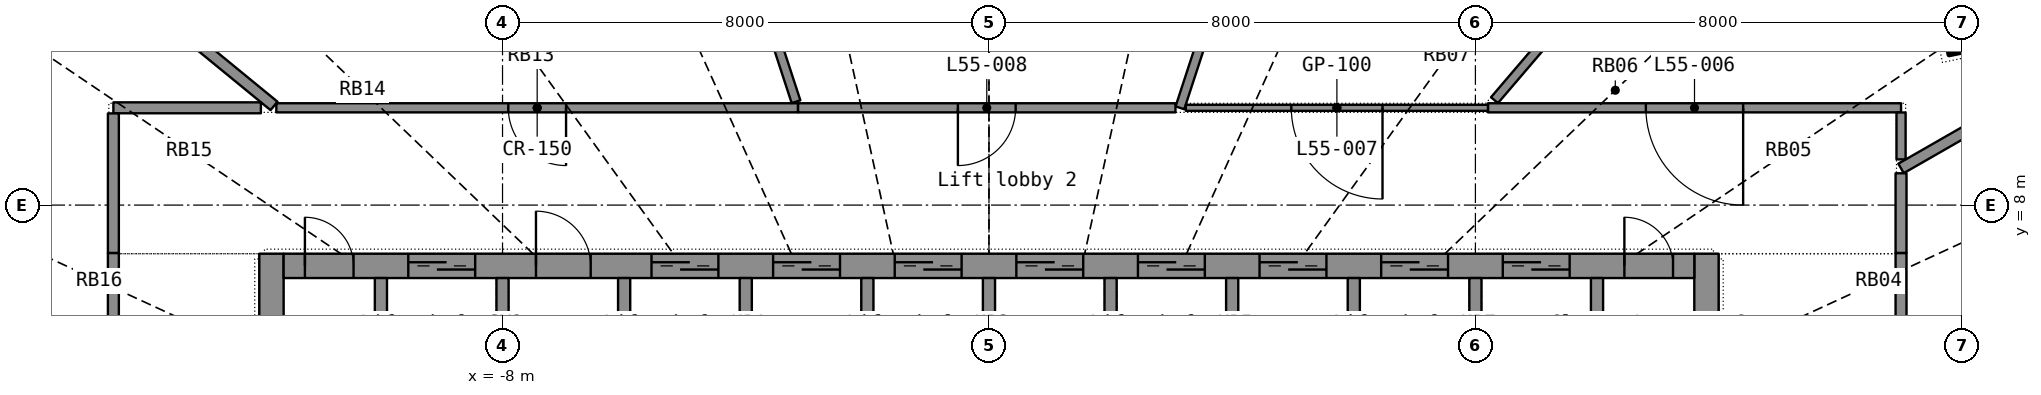
"""IFC4 building model, lengths in metres.
Left out: names, types, materials, properties, quantities, classifications, styles, units other than length and angle.
Written with IfcOpenShell. Run it as: python <this file> out.ifc"""

import sys

from ifc_helpers import new_model, si_unit, direction, frame, frame_2d, origin, origin_2d, place, context, subcontext, project, spatial, rectangle, hollow_rectangle, extrude, element, fill, save


model = new_model("IFC4")
c1 = context("Model", 3, precision=1e-05, world=origin(), true_north=direction((0.0, 1.0)))
c2 = subcontext(c1, "Body", "Model", "MODEL_VIEW")
j1 = project(units=[si_unit("LENGTHUNIT", "METRE"), si_unit("PLANEANGLEUNIT", "RADIAN")], contexts=[c1])
p1 = place(None, origin())
s1 = spatial("IfcSite", under=j1, at=p1, CompositionType="ELEMENT")
p2 = place(p1, origin())
s2 = spatial("IfcBuilding", under=s1, at=p2, CompositionType="ELEMENT")
p3 = place(p2, frame((0.0, 0.0, 228.2)))
s3 = spatial("IfcBuildingStorey", under=s2, at=p3, CompositionType="ELEMENT", Elevation=228.2)
p4 = place(p3, frame((16.021, 10.823, 0.0), z_axis=(-0.026512179, -0.018202391, 0.999482755), x_axis=(0.720721695, -0.693194109, 0.006493471)))
e1 = element("IfcColumn", 1, at=p4, inside=s3, PredefinedType="COLUMN", context=c2, shape_type="SweptSolid", body=[
    extrude(hollow_rectangle(XDim=0.6, YDim=0.6, WallThickness=0.025, at=origin_2d()), origin(), (0.0, 0.0, 1.0), 3.702),
])
p5 = place(p3, frame((-11.8, -7.2, 0.0), z_axis=(0.0, 0.0, 1.0), x_axis=(0.0, 1.0, 0.0)))
e2 = element("IfcWall", 2, at=p5, inside=s3, PredefinedType="SHEAR", context=c2, shape_type="SweptSolid", body=[
    extrude(rectangle(XDim=14.4, YDim=0.4, at=frame_2d((7.2, 0.0))), origin(), (0.0, 0.0, 1.0), 3.3),
])
p6 = place(p5, frame((6.5, 0.0, 0.0)))
e3 = element("IfcOpeningElement", 3, at=p6, cuts=e2, PredefinedType="OPENING", context=c2, shape_type="SweptSolid", body=[
    extrude(rectangle(XDim=1.4, YDim=2.2, at=frame_2d((0.7, 1.1))), frame((0.0, 0.21, 0.0), z_axis=(0.0, -1.0, 0.0), x_axis=(1.0, 0.0, 0.0)), (0.0, 0.0, 1.0), 0.42),
])
p7 = place(p3, frame((11.8, -7.2, 0.0), z_axis=(0.0, 0.0, 1.0), x_axis=(0.0, 1.0, 0.0)))
e4 = element("IfcWall", 4, at=p7, inside=s3, PredefinedType="SHEAR", context=c2, shape_type="SweptSolid", body=[
    extrude(rectangle(XDim=14.4, YDim=0.4, at=frame_2d((7.2, 0.0))), origin(), (0.0, 0.0, 1.0), 3.3),
])
p8 = place(p7, frame((6.5, 0.0, 0.0)))
e5 = element("IfcOpeningElement", 5, at=p8, cuts=e4, PredefinedType="OPENING", context=c2, shape_type="SweptSolid", body=[
    extrude(rectangle(XDim=1.4, YDim=2.2, at=frame_2d((0.7, 1.1))), frame((0.0, 0.21, 0.0), z_axis=(0.0, -1.0, 0.0), x_axis=(1.0, 0.0, 0.0)), (0.0, 0.0, 1.0), 0.42),
])
p9 = place(p3, frame((-11.6, 7.0, 0.0), z_axis=(0.0, 0.0, 1.0), x_axis=(1.0, 0.0, 0.0)))
e6 = element("IfcWall", 6, at=p9, inside=s3, PredefinedType="SHEAR", context=c2, shape_type="SweptSolid", body=[
    extrude(rectangle(XDim=23.2, YDim=0.4, at=frame_2d((11.6, 0.0))), origin(), (0.0, 0.0, 1.0), 3.3),
])
p10 = place(p9, frame((2.05, 0.0, 0.0)))
e7 = element("IfcOpeningElement", 7, at=p10, cuts=e6, PredefinedType="OPENING", context=c2, shape_type="SweptSolid", body=[
    extrude(rectangle(XDim=1.1, YDim=2.2, at=frame_2d((0.55, 1.1))), frame((0.0, 0.21, 0.0), z_axis=(0.0, -1.0, 0.0), x_axis=(1.0, 0.0, 0.0)), (0.0, 0.0, 1.0), 0.42),
])
p11 = place(p9, frame((6.05, 0.0, 0.0)))
e8 = element("IfcOpeningElement", 8, at=p11, cuts=e6, PredefinedType="OPENING", context=c2, shape_type="SweptSolid", body=[
    extrude(rectangle(XDim=1.1, YDim=2.2, at=frame_2d((0.55, 1.1))), frame((0.0, 0.21, 0.0), z_axis=(0.0, -1.0, 0.0), x_axis=(1.0, 0.0, 0.0)), (0.0, 0.0, 1.0), 0.42),
])
p12 = place(p9, frame((8.05, 0.0, 0.0)))
e9 = element("IfcOpeningElement", 9, at=p12, cuts=e6, PredefinedType="OPENING", context=c2, shape_type="SweptSolid", body=[
    extrude(rectangle(XDim=1.1, YDim=2.2, at=frame_2d((0.55, 1.1))), frame((0.0, 0.21, 0.0), z_axis=(0.0, -1.0, 0.0), x_axis=(1.0, 0.0, 0.0)), (0.0, 0.0, 1.0), 0.42),
])
p13 = place(p9, frame((10.05, 0.0, 0.0)))
e10 = element("IfcOpeningElement", 10, at=p13, cuts=e6, PredefinedType="OPENING", context=c2, shape_type="SweptSolid", body=[
    extrude(rectangle(XDim=1.1, YDim=2.2, at=frame_2d((0.55, 1.1))), frame((0.0, 0.21, 0.0), z_axis=(0.0, -1.0, 0.0), x_axis=(1.0, 0.0, 0.0)), (0.0, 0.0, 1.0), 0.42),
])
p14 = place(p9, frame((12.05, 0.0, 0.0)))
e11 = element("IfcOpeningElement", 11, at=p14, cuts=e6, PredefinedType="OPENING", context=c2, shape_type="SweptSolid", body=[
    extrude(rectangle(XDim=1.1, YDim=2.2, at=frame_2d((0.55, 1.1))), frame((0.0, 0.21, 0.0), z_axis=(0.0, -1.0, 0.0), x_axis=(1.0, 0.0, 0.0)), (0.0, 0.0, 1.0), 0.42),
])
p15 = place(p9, frame((14.05, 0.0, 0.0)))
e12 = element("IfcOpeningElement", 12, at=p15, cuts=e6, PredefinedType="OPENING", context=c2, shape_type="SweptSolid", body=[
    extrude(rectangle(XDim=1.1, YDim=2.2, at=frame_2d((0.55, 1.1))), frame((0.0, 0.21, 0.0), z_axis=(0.0, -1.0, 0.0), x_axis=(1.0, 0.0, 0.0)), (0.0, 0.0, 1.0), 0.42),
])
p16 = place(p9, frame((16.05, 0.0, 0.0)))
e13 = element("IfcOpeningElement", 13, at=p16, cuts=e6, PredefinedType="OPENING", context=c2, shape_type="SweptSolid", body=[
    extrude(rectangle(XDim=1.1, YDim=2.2, at=frame_2d((0.55, 1.1))), frame((0.0, 0.21, 0.0), z_axis=(0.0, -1.0, 0.0), x_axis=(1.0, 0.0, 0.0)), (0.0, 0.0, 1.0), 0.42),
])
p17 = place(p9, frame((18.05, 0.0, 0.0)))
e14 = element("IfcOpeningElement", 14, at=p17, cuts=e6, PredefinedType="OPENING", context=c2, shape_type="SweptSolid", body=[
    extrude(rectangle(XDim=1.1, YDim=2.2, at=frame_2d((0.55, 1.1))), frame((0.0, 0.21, 0.0), z_axis=(0.0, -1.0, 0.0), x_axis=(1.0, 0.0, 0.0)), (0.0, 0.0, 1.0), 0.42),
])
p18 = place(p9, frame((20.05, 0.0, 0.0)))
e15 = element("IfcOpeningElement", 15, at=p18, cuts=e6, PredefinedType="OPENING", context=c2, shape_type="SweptSolid", body=[
    extrude(rectangle(XDim=1.1, YDim=2.2, at=frame_2d((0.55, 1.1))), frame((0.0, 0.21, 0.0), z_axis=(0.0, -1.0, 0.0), x_axis=(1.0, 0.0, 0.0)), (0.0, 0.0, 1.0), 0.42),
])
p19 = place(p9, frame((4.15, 0.0, 0.0)))
e16 = element("IfcOpeningElement", 16, at=p19, cuts=e6, PredefinedType="OPENING", context=c2, shape_type="SweptSolid", body=[
    extrude(rectangle(XDim=0.9, YDim=2.1, at=frame_2d((0.45, 1.05))), frame((0.0, 0.21, 0.0), z_axis=(0.0, -1.0, 0.0), x_axis=(1.0, 0.0, 0.0)), (0.0, 0.0, 1.0), 0.42),
])
p20 = place(p9, frame((0.35, 0.0, 0.0)))
e17 = element("IfcOpeningElement", 17, at=p20, cuts=e6, PredefinedType="OPENING", context=c2, shape_type="SweptSolid", body=[
    extrude(rectangle(XDim=0.8, YDim=2.05, at=frame_2d((0.4, 1.025))), frame((0.0, 0.21, 0.0), z_axis=(0.0, -1.0, 0.0), x_axis=(1.0, 0.0, 0.0)), (0.0, 0.0, 1.0), 0.42),
])
p21 = place(p9, frame((22.05, 0.0, 0.0)))
e18 = element("IfcOpeningElement", 18, at=p21, cuts=e6, PredefinedType="OPENING", context=c2, shape_type="SweptSolid", body=[
    extrude(rectangle(XDim=0.8, YDim=2.05, at=frame_2d((0.4, 1.025))), frame((0.0, 0.21, 0.0), z_axis=(0.0, -1.0, 0.0), x_axis=(1.0, 0.0, 0.0)), (0.0, 0.0, 1.0), 0.42),
])
for number, where, z_axis, x_axis in (
    (19, (-10.0, 3.9, 0.0), (0.0, 0.0, 1.0), (0.0, 1.0, 0.0)),
    (20, (-8.0, 3.9, 0.0), (0.0, 0.0, 1.0), (0.0, 1.0, 0.0)),
    (21, (-6.0, 3.9, 0.0), (0.0, 0.0, 1.0), (0.0, 1.0, 0.0)),
    (22, (-4.0, 3.9, 0.0), (0.0, 0.0, 1.0), (0.0, 1.0, 0.0)),
    (23, (-2.0, 3.9, 0.0), (0.0, 0.0, 1.0), (0.0, 1.0, 0.0)),
    (24, (0.0, 3.9, 0.0), (0.0, 0.0, 1.0), (0.0, 1.0, 0.0)),
    (25, (2.0, 3.9, 0.0), (0.0, 0.0, 1.0), (0.0, 1.0, 0.0)),
    (26, (4.0, 3.9, 0.0), (0.0, 0.0, 1.0), (0.0, 1.0, 0.0)),
    (27, (6.0, 3.9, 0.0), (0.0, 0.0, 1.0), (0.0, 1.0, 0.0)),
    (28, (8.0, 3.9, 0.0), (0.0, 0.0, 1.0), (0.0, 1.0, 0.0)),
    (29, (10.0, 3.9, 0.0), (0.0, 0.0, 1.0), (0.0, 1.0, 0.0)),
):
    element("IfcWall", number, at=place(p3, frame(where, z_axis=z_axis, x_axis=x_axis)), inside=s3, PredefinedType="SHEAR", context=c2, shape_type="SweptSolid", body=[
        extrude(rectangle(XDim=2.9, YDim=0.2, at=frame_2d((1.45, 0.0))), origin(), (0.0, 0.0, 1.0), 3.3),
    ])
p22 = place(p3, frame((-3.14, 9.6, 0.0), z_axis=(0.0, 0.0, 1.0), x_axis=(-1.0, 0.0, 0.0)))
e30 = element("IfcWall", 30, at=p22, inside=s3, PredefinedType="PARTITIONING", context=c2, shape_type="SweptSolid", body=[
    extrude(rectangle(XDim=8.58, YDim=0.15, at=frame_2d((4.29, 0.0))), origin(), (0.0, 0.0, 1.0), 2.4),
])
p23 = place(p22, frame((3.815, 0.0, 0.0)))
e31 = element("IfcOpeningElement", 31, at=p23, cuts=e30, PredefinedType="OPENING", context=c2, shape_type="SweptSolid", body=[
    extrude(rectangle(XDim=0.95, YDim=2.15, at=frame_2d((0.475, 1.075))), frame((0.0, 0.085, 0.0), z_axis=(0.0, -1.0, 0.0), x_axis=(1.0, 0.0, 0.0)), (0.0, 0.0, 1.0), 0.17),
])
p24 = place(p3, frame((-5.515, 16.859, 0.0), z_axis=(0.0, 0.0, 1.0), x_axis=(0.310923007, -0.950435102, 0.0)))
e32 = element("IfcWall", 32, at=p24, inside=s3, PredefinedType="PARTITIONING", context=c2, shape_type="SweptSolid", body=[
    extrude(rectangle(XDim=7.532, YDim=0.15, at=frame_2d((3.766, 0.0))), origin(), (0.0, 0.0, 1.0), 2.4),
])
p25 = place(p3, frame((5.515, 16.858, 0.0), z_axis=(0.0, 0.0, 1.0), x_axis=(-0.31091882, -0.950436472, 0.0)))
e33 = element("IfcWall", 33, at=p25, inside=s3, PredefinedType="PARTITIONING", context=c2, shape_type="SweptSolid", body=[
    extrude(rectangle(XDim=7.636, YDim=0.15, at=frame_2d((3.818, 0.0))), origin(), (0.0, 0.0, 1.0), 2.4),
])
p26 = place(p3, frame((15.0, 9.6, 0.0), z_axis=(0.0, 0.0, 1.0), x_axis=(-1.0, 0.0, 0.0)))
e34 = element("IfcWall", 34, at=p26, inside=s3, PredefinedType="PARTITIONING", context=c2, shape_type="SweptSolid", body=[
    extrude(rectangle(XDim=6.793, YDim=0.15, at=frame_2d((3.397, 0.0))), origin(), (0.0, 0.0, 1.0), 2.4),
])
p27 = place(p26, frame((2.597, 0.0, 0.0)))
e35 = element("IfcOpeningElement", 35, at=p27, cuts=e34, PredefinedType="OPENING", context=c2, shape_type="SweptSolid", body=[
    extrude(rectangle(XDim=1.6, YDim=2.4, at=frame_2d((0.8, 1.2))), frame((0.0, 0.085, 0.0), z_axis=(0.0, -1.0, 0.0), x_axis=(1.0, 0.0, 0.0)), (0.0, 0.0, 1.0), 0.17),
])
p28 = place(p3, frame((3.067, 9.6, 0.0), z_axis=(0.0, 0.0, 1.0), x_axis=(-1.0, 0.0, 0.0)))
e36 = element("IfcWall", 36, at=p28, inside=s3, PredefinedType="PARTITIONING", context=c2, shape_type="SweptSolid", body=[
    extrude(rectangle(XDim=6.207, YDim=0.15, at=frame_2d((3.103, 0.0))), origin(), (0.0, 0.0, 1.0), 2.4),
])
p29 = place(p28, frame((2.628, 0.0, 0.0)))
e37 = element("IfcOpeningElement", 37, at=p29, cuts=e36, PredefinedType="OPENING", context=c2, shape_type="SweptSolid", body=[
    extrude(rectangle(XDim=0.95, YDim=2.15, at=frame_2d((0.475, 1.075))), frame((0.0, 0.085, 0.0), z_axis=(0.0, -1.0, 0.0), x_axis=(1.0, 0.0, 0.0)), (0.0, 0.0, 1.0), 0.17),
])
p30 = place(p3, frame((-14.4, 7.212, 0.0), z_axis=(0.0, 0.0, 1.0), x_axis=(0.0, -1.0, 0.0)))
e38 = element("IfcWall", 38, at=p30, inside=s3, PredefinedType="PARTITIONING", context=c2, shape_type="SweptSolid", body=[
    extrude(rectangle(XDim=5.712, YDim=0.18, at=frame_2d((2.856, 0.0))), origin(), (0.0, 0.0, 1.0), 2.4),
])
p31 = place(p30, frame((2.356, 0.0, 0.0)))
e39 = element("IfcOpeningElement", 39, at=p31, cuts=e38, PredefinedType="OPENING", context=c2, shape_type="SweptSolid", body=[
    extrude(rectangle(XDim=1.0, YDim=2.1, at=frame_2d((0.5, 1.05))), frame((0.0, 0.1, 0.0), z_axis=(0.0, -1.0, 0.0), x_axis=(1.0, 0.0, 0.0)), (0.0, 0.0, 1.0), 0.2),
])
p32 = place(p3, frame((15.0, 1.5, 0.0), z_axis=(0.0, 0.0, 1.0), x_axis=(0.0, 1.0, 0.0)))
e40 = element("IfcWall", 40, at=p32, inside=s3, PredefinedType="PARTITIONING", context=c2, shape_type="SweptSolid", body=[
    extrude(rectangle(XDim=5.712, YDim=0.18, at=frame_2d((2.856, 0.0))), origin(), (0.0, 0.0, 1.0), 2.4),
])
p33 = place(p32, frame((2.356, 0.0, 0.0)))
e41 = element("IfcOpeningElement", 41, at=p33, cuts=e40, PredefinedType="OPENING", context=c2, shape_type="SweptSolid", body=[
    extrude(rectangle(XDim=1.0, YDim=2.1, at=frame_2d((0.5, 1.05))), frame((0.0, 0.1, 0.0), z_axis=(0.0, -1.0, 0.0), x_axis=(1.0, 0.0, 0.0)), (0.0, 0.0, 1.0), 0.2),
])
p34 = place(p3, frame((8.207, 9.6, 0.0), z_axis=(0.0, 0.0, 1.0), x_axis=(-1.0, 0.0, 0.0)))
e42 = element("IfcWall", 42, at=p34, inside=s3, PredefinedType="PARTITIONING", context=c2, shape_type="SweptSolid", body=[
    extrude(rectangle(XDim=4.969, YDim=0.1, at=frame_2d((2.484, 0.0))), origin(), (0.0, 0.0, 1.0), 2.4),
])
p35 = place(p34, frame((1.734, 0.0, 0.0)))
e43 = element("IfcOpeningElement", 43, at=p35, cuts=e42, PredefinedType="OPENING", context=c2, shape_type="SweptSolid", body=[
    extrude(rectangle(XDim=1.5, YDim=2.4, at=frame_2d((0.75, 1.2))), frame((0.0, 0.06, 0.0), z_axis=(0.0, -1.0, 0.0), x_axis=(1.0, 0.0, 0.0)), (0.0, 0.0, 1.0), 0.12),
])
p36 = place(p3, frame((11.079, 12.96, 0.0), z_axis=(0.0, 0.0, 1.0), x_axis=(-0.649789169, -0.760114489, 0.0)))
e44 = element("IfcWall", 44, at=p36, inside=s3, PredefinedType="PARTITIONING", context=c2, shape_type="SweptSolid", body=[
    extrude(rectangle(XDim=4.255, YDim=0.15, at=frame_2d((2.128, 0.0))), origin(), (0.0, 0.0, 1.0), 2.4),
])
p37 = place(p3, frame((-15.075, 12.348, 0.0), z_axis=(0.0, 0.0, 1.0), x_axis=(0.773594361, -0.633681122, 0.0)))
e45 = element("IfcWall", 45, at=p37, inside=s3, PredefinedType="PARTITIONING", context=c2, shape_type="SweptSolid", body=[
    extrude(rectangle(XDim=4.287, YDim=0.18, at=frame_2d((2.144, 0.0))), origin(), (0.0, 0.0, 1.0), 2.4),
])
p38 = place(p3, frame((17.466, 10.017, 0.0), z_axis=(0.0, 0.0, 1.0), x_axis=(-0.867459752, -0.497507365, 0.0)))
e46 = element("IfcWall", 46, at=p38, inside=s3, PredefinedType="PARTITIONING", context=c2, shape_type="SweptSolid", body=[
    extrude(rectangle(XDim=2.842, YDim=0.18, at=frame_2d((1.421, 0.0))), origin(), (0.0, 0.0, 1.0), 2.4),
])
p39 = place(p3, frame((-11.974, 9.6, 0.0), z_axis=(0.0, 0.0, 1.0), x_axis=(-1.0, 0.0, 0.0)))
e47 = element("IfcWall", 47, at=p39, inside=s3, PredefinedType="PARTITIONING", context=c2, shape_type="SweptSolid", body=[
    extrude(rectangle(XDim=2.426, YDim=0.18, at=frame_2d((1.213, 0.0))), origin(), (0.0, 0.0, 1.0), 2.4),
])
p40 = place(p3, frame((-14.4, 9.508, 0.0), z_axis=(0.0, 0.0, 1.0), x_axis=(0.0, -1.0, 0.0)))
e48 = element("IfcWall", 48, at=p40, inside=s3, PredefinedType="PARTITIONING", context=c2, shape_type="SweptSolid", body=[
    extrude(rectangle(XDim=2.295, YDim=0.18, at=frame_2d((1.147, 0.0))), origin(), (0.0, 0.0, 1.0), 2.4),
])
p41 = place(p3, frame((15.0, 7.213, 0.0), z_axis=(0.0, 0.0, 1.0), x_axis=(0.0, 1.0, 0.0)))
e49 = element("IfcWall", 49, at=p41, inside=s3, PredefinedType="PARTITIONING", context=c2, shape_type="SweptSolid", body=[
    extrude(rectangle(XDim=1.31, YDim=0.18, at=frame_2d((0.655, 0.0))), origin(), (0.0, 0.0, 1.0), 2.4),
])
p42 = place(p3, frame((15.0, 8.752, 0.0), z_axis=(0.0, 0.0, 1.0), x_axis=(0.0, 1.0, 0.0)))
e50 = element("IfcWall", 50, at=p42, inside=s3, PredefinedType="PARTITIONING", context=c2, shape_type="SweptSolid", body=[
    extrude(rectangle(XDim=0.771, YDim=0.15, at=frame_2d((0.385, 0.0))), origin(), (0.0, 0.0, 1.0), 2.4),
])
p43 = place(p10, origin())
e51 = element("IfcDoor", 51, at=p43, inside=s3, OperationType="DOUBLE_DOOR_SLIDING", PredefinedType="DOOR", context=c2, shape_type="SweptSolid", body=[
    extrude(rectangle(XDim=1.1, YDim=2.2, at=frame_2d((0.55, 1.1))), frame((0.0, 0.025, 0.0), z_axis=(0.0, -1.0, 0.0), x_axis=(1.0, 0.0, 0.0)), (0.0, 0.0, 1.0), 0.05),
])
fill(e7, e51)
p44 = place(p11, origin())
e52 = element("IfcDoor", 52, at=p44, inside=s3, OperationType="DOUBLE_DOOR_SLIDING", PredefinedType="DOOR", context=c2, shape_type="SweptSolid", body=[
    extrude(rectangle(XDim=1.1, YDim=2.2, at=frame_2d((0.55, 1.1))), frame((0.0, 0.025, 0.0), z_axis=(0.0, -1.0, 0.0), x_axis=(1.0, 0.0, 0.0)), (0.0, 0.0, 1.0), 0.05),
])
fill(e8, e52)
p45 = place(p12, origin())
e53 = element("IfcDoor", 53, at=p45, inside=s3, OperationType="DOUBLE_DOOR_SLIDING", PredefinedType="DOOR", context=c2, shape_type="SweptSolid", body=[
    extrude(rectangle(XDim=1.1, YDim=2.2, at=frame_2d((0.55, 1.1))), frame((0.0, 0.025, 0.0), z_axis=(0.0, -1.0, 0.0), x_axis=(1.0, 0.0, 0.0)), (0.0, 0.0, 1.0), 0.05),
])
fill(e9, e53)
p46 = place(p13, origin())
e54 = element("IfcDoor", 54, at=p46, inside=s3, OperationType="DOUBLE_DOOR_SLIDING", PredefinedType="DOOR", context=c2, shape_type="SweptSolid", body=[
    extrude(rectangle(XDim=1.1, YDim=2.2, at=frame_2d((0.55, 1.1))), frame((0.0, 0.025, 0.0), z_axis=(0.0, -1.0, 0.0), x_axis=(1.0, 0.0, 0.0)), (0.0, 0.0, 1.0), 0.05),
])
fill(e10, e54)
p47 = place(p14, origin())
e55 = element("IfcDoor", 55, at=p47, inside=s3, OperationType="DOUBLE_DOOR_SLIDING", PredefinedType="DOOR", context=c2, shape_type="SweptSolid", body=[
    extrude(rectangle(XDim=1.1, YDim=2.2, at=frame_2d((0.55, 1.1))), frame((0.0, 0.025, 0.0), z_axis=(0.0, -1.0, 0.0), x_axis=(1.0, 0.0, 0.0)), (0.0, 0.0, 1.0), 0.05),
])
fill(e11, e55)
p48 = place(p15, origin())
e56 = element("IfcDoor", 56, at=p48, inside=s3, OperationType="DOUBLE_DOOR_SLIDING", PredefinedType="DOOR", context=c2, shape_type="SweptSolid", body=[
    extrude(rectangle(XDim=1.1, YDim=2.2, at=frame_2d((0.55, 1.1))), frame((0.0, 0.025, 0.0), z_axis=(0.0, -1.0, 0.0), x_axis=(1.0, 0.0, 0.0)), (0.0, 0.0, 1.0), 0.05),
])
fill(e12, e56)
p49 = place(p16, origin())
e57 = element("IfcDoor", 57, at=p49, inside=s3, OperationType="DOUBLE_DOOR_SLIDING", PredefinedType="DOOR", context=c2, shape_type="SweptSolid", body=[
    extrude(rectangle(XDim=1.1, YDim=2.2, at=frame_2d((0.55, 1.1))), frame((0.0, 0.025, 0.0), z_axis=(0.0, -1.0, 0.0), x_axis=(1.0, 0.0, 0.0)), (0.0, 0.0, 1.0), 0.05),
])
fill(e13, e57)
p50 = place(p17, origin())
e58 = element("IfcDoor", 58, at=p50, inside=s3, OperationType="DOUBLE_DOOR_SLIDING", PredefinedType="DOOR", context=c2, shape_type="SweptSolid", body=[
    extrude(rectangle(XDim=1.1, YDim=2.2, at=frame_2d((0.55, 1.1))), frame((0.0, 0.025, 0.0), z_axis=(0.0, -1.0, 0.0), x_axis=(1.0, 0.0, 0.0)), (0.0, 0.0, 1.0), 0.05),
])
fill(e14, e58)
p51 = place(p18, origin())
e59 = element("IfcDoor", 59, at=p51, inside=s3, OperationType="DOUBLE_DOOR_SLIDING", PredefinedType="DOOR", context=c2, shape_type="SweptSolid", body=[
    extrude(rectangle(XDim=1.1, YDim=2.2, at=frame_2d((0.55, 1.1))), frame((0.0, 0.025, 0.0), z_axis=(0.0, -1.0, 0.0), x_axis=(1.0, 0.0, 0.0)), (0.0, 0.0, 1.0), 0.05),
])
fill(e15, e59)
p52 = place(p19, origin())
e60 = element("IfcDoor", 60, at=p52, inside=s3, OperationType="SINGLE_SWING_LEFT", PredefinedType="DOOR", context=c2, shape_type="SweptSolid", body=[
    extrude(rectangle(XDim=0.9, YDim=2.1, at=frame_2d((0.45, 1.05))), frame((0.0, 0.025, 0.0), z_axis=(0.0, -1.0, 0.0), x_axis=(1.0, 0.0, 0.0)), (0.0, 0.0, 1.0), 0.05),
])
fill(e16, e60)
p53 = place(p20, origin())
e61 = element("IfcDoor", 61, at=p53, inside=s3, OperationType="SINGLE_SWING_LEFT", PredefinedType="DOOR", context=c2, shape_type="SweptSolid", body=[
    extrude(rectangle(XDim=0.8, YDim=2.05, at=frame_2d((0.4, 1.025))), frame((0.0, 0.025, 0.0), z_axis=(0.0, -1.0, 0.0), x_axis=(1.0, 0.0, 0.0)), (0.0, 0.0, 1.0), 0.05),
])
fill(e17, e61)
p54 = place(p21, origin())
e62 = element("IfcDoor", 62, at=p54, inside=s3, OperationType="SINGLE_SWING_LEFT", PredefinedType="DOOR", context=c2, shape_type="SweptSolid", body=[
    extrude(rectangle(XDim=0.8, YDim=2.05, at=frame_2d((0.4, 1.025))), frame((0.0, 0.025, 0.0), z_axis=(0.0, -1.0, 0.0), x_axis=(1.0, 0.0, 0.0)), (0.0, 0.0, 1.0), 0.05),
])
fill(e18, e62)
p55 = place(p27, origin())
e63 = element("IfcDoor", 63, at=p55, inside=s3, OperationType="DOUBLE_DOOR_SINGLE_SWING", PredefinedType="DOOR", context=c2, shape_type="SweptSolid", body=[
    extrude(rectangle(XDim=1.6, YDim=2.4, at=frame_2d((0.8, 1.2))), frame((0.0, 0.025, 0.0), z_axis=(0.0, -1.0, 0.0), x_axis=(1.0, 0.0, 0.0)), (0.0, 0.0, 1.0), 0.05),
])
fill(e35, e63)
p56 = place(p35, origin())
e64 = element("IfcDoor", 64, at=p56, inside=s3, OperationType="DOUBLE_DOOR_SINGLE_SWING", PredefinedType="DOOR", context=c2, shape_type="SweptSolid", body=[
    extrude(rectangle(XDim=1.5, YDim=2.4, at=frame_2d((0.75, 1.2))), frame((0.0, 0.025, 0.0), z_axis=(0.0, -1.0, 0.0), x_axis=(1.0, 0.0, 0.0)), (0.0, 0.0, 1.0), 0.05),
])
fill(e43, e64)
p57 = place(p29, origin())
e65 = element("IfcDoor", 65, at=p57, inside=s3, OperationType="SINGLE_SWING_RIGHT", PredefinedType="DOOR", context=c2, shape_type="SweptSolid", body=[
    extrude(rectangle(XDim=0.95, YDim=2.15, at=frame_2d((0.475, 1.075))), frame((0.0, 0.025, 0.0), z_axis=(0.0, -1.0, 0.0), x_axis=(1.0, 0.0, 0.0)), (0.0, 0.0, 1.0), 0.05),
])
fill(e37, e65)
p58 = place(p23, origin())
e66 = element("IfcDoor", 66, at=p58, inside=s3, OperationType="SINGLE_SWING_LEFT", PredefinedType="DOOR", context=c2, shape_type="SweptSolid", body=[
    extrude(rectangle(XDim=0.95, YDim=2.15, at=frame_2d((0.475, 1.075))), frame((0.0, 0.025, 0.0), z_axis=(0.0, -1.0, 0.0), x_axis=(1.0, 0.0, 0.0)), (0.0, 0.0, 1.0), 0.05),
])
fill(e31, e66)
save(model, sys.argv[1])
